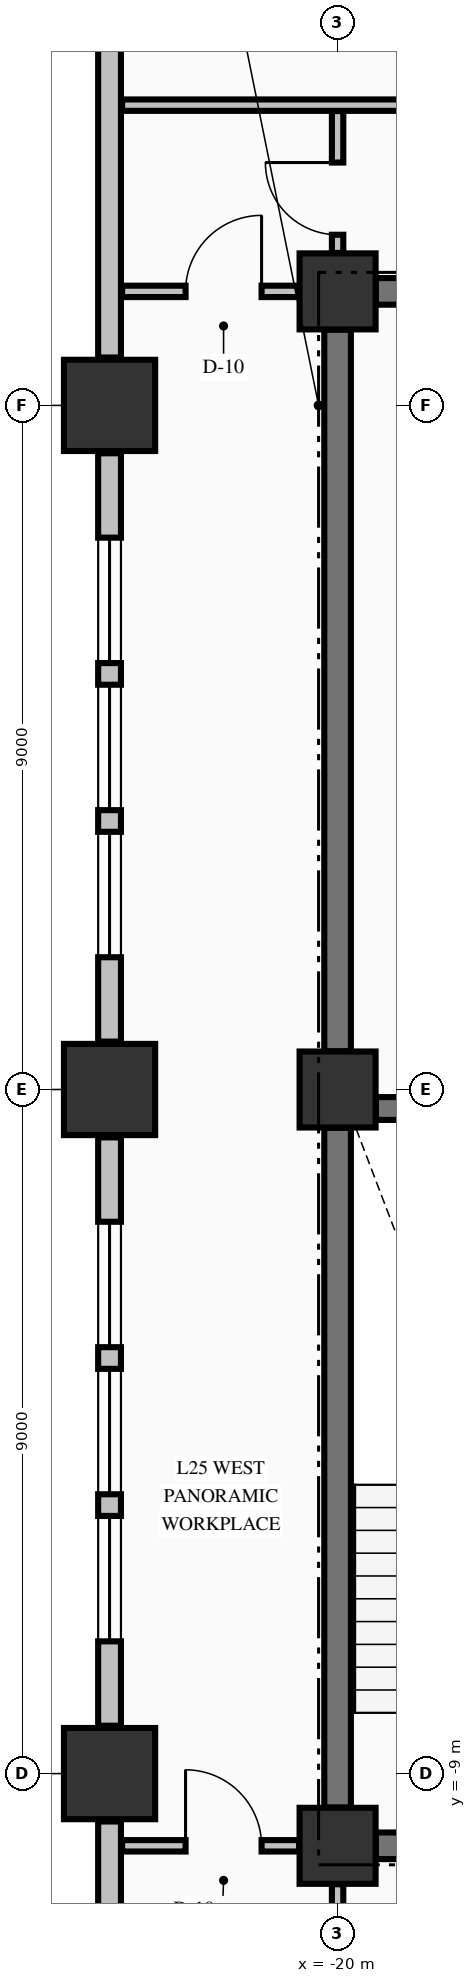
"""IFC4 building model, lengths in metres.
Left out: names, types, materials, properties, quantities, classifications, styles, units other than length and angle.
Written with IfcOpenShell. Run it as: python <this file> out.ifc"""

import sys

from ifc_helpers import new_model, si_unit, direction, frame, frame_2d, origin, origin_2d, place, context, subcontext, project, spatial, rectangle, extrude, element, fill, save


model = new_model("IFC4")
c1 = context("Model", 3, precision=1e-05, world=origin(), true_north=direction((0.0, 1.0)))
c2 = subcontext(c1, "Body", "Model", "MODEL_VIEW")
j1 = project(units=[si_unit("LENGTHUNIT", "METRE"), si_unit("PLANEANGLEUNIT", "RADIAN")], contexts=[c1])
p1 = place(None, origin())
s1 = spatial("IfcSite", under=j1, at=p1, CompositionType="ELEMENT")
p2 = place(p1, origin())
s2 = spatial("IfcBuilding", under=s1, at=p2, CompositionType="ELEMENT")
p3 = place(p2, frame((0.0, 0.0, 102.07)))
s3 = spatial("IfcBuildingStorey", under=s2, at=p3, CompositionType="ELEMENT", Elevation=102.07)
for number, where, z_axis, x_axis in (
    (1, (-23.0, -9.0, -0.25), (0.0, 0.0, 1.0), (1.0, 0.0, 0.0)),
    (2, (-23.0, 0.0, -0.25), (0.0, 0.0, 1.0), (1.0, 0.0, 0.0)),
    (3, (-23.0, 9.0, -0.25), (0.0, 0.0, 1.0), (1.0, 0.0, 0.0)),
):
    element("IfcColumn", number, at=place(p3, frame(where, z_axis=z_axis, x_axis=x_axis)), inside=s3, PredefinedType="COLUMN", context=c2, shape_type="SweptSolid", body=[
        extrude(rectangle(XDim=1.2, YDim=1.2, at=origin_2d()), origin(), (0.0, 0.0, 1.0), 3.57),
    ])
for number, where, z_axis, x_axis in (
    (4, (-20.0, -9.95, -0.25), (0.0, 0.0, 1.0), (1.0, 0.0, 0.0)),
    (5, (-20.0, 10.5, -0.25), (0.0, 0.0, 1.0), (1.0, 0.0, 0.0)),
    (6, (-20.0, 0.0, -0.25), (0.0, 0.0, 1.0), (1.0, 0.0, 0.0)),
):
    element("IfcColumn", number, at=place(p3, frame(where, z_axis=z_axis, x_axis=x_axis)), inside=s3, PredefinedType="COLUMN", context=c2, shape_type="SweptSolid", body=[
        extrude(rectangle(XDim=1.0, YDim=1.0, at=origin_2d()), origin(), (0.0, 0.0, 1.0), 3.57),
    ])
p4 = place(p3, frame((-23.0, -9.63, 0.0), z_axis=(0.0, 0.0, 1.0), x_axis=(0.0, -1.0, 0.0)))
e7 = element("IfcWall", 7, at=p4, inside=s3, PredefinedType="STANDARD", context=c2, shape_type="SweptSolid", body=[
    extrude(rectangle(XDim=10.74, YDim=0.3, at=frame_2d((5.37, 0.0))), origin(), (0.0, 0.0, 1.0), 2.712),
])
p5 = place(p3, frame((-23.0, -0.63, 0.0), z_axis=(0.0, 0.0, 1.0), x_axis=(0.0, -1.0, 0.0)))
e8 = element("IfcWall", 8, at=p5, inside=s3, PredefinedType="STANDARD", context=c2, shape_type="SweptSolid", body=[
    extrude(rectangle(XDim=7.74, YDim=0.3, at=frame_2d((3.87, 0.0))), origin(), (0.0, 0.0, 1.0), 2.712),
])
p6 = place(p5, frame((1.11, 0.0, 0.8)))
e9 = element("IfcOpeningElement", 9, at=p6, cuts=e8, PredefinedType="OPENING", context=c2, shape_type="SweptSolid", body=[
    extrude(rectangle(XDim=1.65, YDim=1.7, at=frame_2d((0.825, 0.85))), frame((0.0, 0.16, 0.0), z_axis=(0.0, -1.0, 0.0), x_axis=(1.0, 0.0, 0.0)), (0.0, 0.0, 1.0), 0.32),
])
p7 = place(p5, frame((3.045, 0.0, 0.8)))
e10 = element("IfcOpeningElement", 10, at=p7, cuts=e8, PredefinedType="OPENING", context=c2, shape_type="SweptSolid", body=[
    extrude(rectangle(XDim=1.65, YDim=1.7, at=frame_2d((0.825, 0.85))), frame((0.0, 0.16, 0.0), z_axis=(0.0, -1.0, 0.0), x_axis=(1.0, 0.0, 0.0)), (0.0, 0.0, 1.0), 0.32),
])
p8 = place(p5, frame((4.98, 0.0, 0.8)))
e11 = element("IfcOpeningElement", 11, at=p8, cuts=e8, PredefinedType="OPENING", context=c2, shape_type="SweptSolid", body=[
    extrude(rectangle(XDim=1.65, YDim=1.7, at=frame_2d((0.825, 0.85))), frame((0.0, 0.16, 0.0), z_axis=(0.0, -1.0, 0.0), x_axis=(1.0, 0.0, 0.0)), (0.0, 0.0, 1.0), 0.32),
])
p9 = place(p3, frame((-23.0, 8.37, 0.0), z_axis=(0.0, 0.0, 1.0), x_axis=(0.0, -1.0, 0.0)))
e12 = element("IfcWall", 12, at=p9, inside=s3, PredefinedType="STANDARD", context=c2, shape_type="SweptSolid", body=[
    extrude(rectangle(XDim=7.74, YDim=0.3, at=frame_2d((3.87, 0.0))), origin(), (0.0, 0.0, 1.0), 2.712),
])
p10 = place(p9, frame((1.11, 0.0, 0.8)))
e13 = element("IfcOpeningElement", 13, at=p10, cuts=e12, PredefinedType="OPENING", context=c2, shape_type="SweptSolid", body=[
    extrude(rectangle(XDim=1.65, YDim=1.7, at=frame_2d((0.825, 0.85))), frame((0.0, 0.16, 0.0), z_axis=(0.0, -1.0, 0.0), x_axis=(1.0, 0.0, 0.0)), (0.0, 0.0, 1.0), 0.32),
])
p11 = place(p9, frame((3.045, 0.0, 0.8)))
e14 = element("IfcOpeningElement", 14, at=p11, cuts=e12, PredefinedType="OPENING", context=c2, shape_type="SweptSolid", body=[
    extrude(rectangle(XDim=1.65, YDim=1.7, at=frame_2d((0.825, 0.85))), frame((0.0, 0.16, 0.0), z_axis=(0.0, -1.0, 0.0), x_axis=(1.0, 0.0, 0.0)), (0.0, 0.0, 1.0), 0.32),
])
p12 = place(p9, frame((4.98, 0.0, 0.8)))
e15 = element("IfcOpeningElement", 15, at=p12, cuts=e12, PredefinedType="OPENING", context=c2, shape_type="SweptSolid", body=[
    extrude(rectangle(XDim=1.65, YDim=1.7, at=frame_2d((0.825, 0.85))), frame((0.0, 0.16, 0.0), z_axis=(0.0, -1.0, 0.0), x_axis=(1.0, 0.0, 0.0)), (0.0, 0.0, 1.0), 0.32),
])
p13 = place(p3, frame((-23.0, 20.37, 0.0), z_axis=(0.0, 0.0, 1.0), x_axis=(0.0, -1.0, 0.0)))
e16 = element("IfcWall", 16, at=p13, inside=s3, PredefinedType="STANDARD", context=c2, shape_type="SweptSolid", body=[
    extrude(rectangle(XDim=10.74, YDim=0.3, at=frame_2d((5.37, 0.0))), origin(), (0.0, 0.0, 1.0), 2.712),
])
p14 = place(p3, frame((-19.496, -9.95, 0.0), z_axis=(0.0, 0.0, 1.0), x_axis=(1.0, 0.0, 0.0)))
e17 = element("IfcWall", 17, at=p14, inside=s3, PredefinedType="SHEAR", context=c2, shape_type="SweptSolid", body=[
    extrude(rectangle(XDim=4.796, YDim=0.35, at=frame_2d((2.398, 0.0))), origin(), (0.0, 0.0, 1.0), 3.32),
])
p15 = place(p14, frame((0.671, 0.0, 0.0)))
e18 = element("IfcOpeningElement", 18, at=p15, cuts=e17, PredefinedType="OPENING", context=c2, shape_type="SweptSolid", body=[
    extrude(rectangle(XDim=1.05, YDim=2.15, at=frame_2d((0.525, 1.075))), frame((0.0, 0.185, 0.0), z_axis=(0.0, -1.0, 0.0), x_axis=(1.0, 0.0, 0.0)), (0.0, 0.0, 1.0), 0.37),
])
p16 = place(p3, frame((-19.496, -0.25, 0.0), z_axis=(0.0, 0.0, 1.0), x_axis=(1.0, 0.0, 0.0)))
e19 = element("IfcWall", 19, at=p16, inside=s3, PredefinedType="SHEAR", context=c2, shape_type="SweptSolid", body=[
    extrude(rectangle(XDim=7.992, YDim=0.3, at=frame_2d((3.996, 0.0))), origin(), (0.0, 0.0, 1.0), 3.32),
])
p17 = place(p16, frame((5.796, 0.0, 0.0)))
e20 = element("IfcOpeningElement", 20, at=p17, cuts=e19, PredefinedType="OPENING", context=c2, shape_type="SweptSolid", body=[
    extrude(rectangle(XDim=1.1, YDim=2.15, at=frame_2d((0.55, 1.075))), frame((0.0, 0.16, 0.0), z_axis=(0.0, -1.0, 0.0), x_axis=(1.0, 0.0, 0.0)), (0.0, 0.0, 1.0), 0.32),
])
p18 = place(p3, frame((-19.496, 10.5, 0.0), z_axis=(0.0, 0.0, 1.0), x_axis=(1.0, 0.0, 0.0)))
e21 = element("IfcWall", 21, at=p18, inside=s3, PredefinedType="SHEAR", context=c2, shape_type="SweptSolid", body=[
    extrude(rectangle(XDim=4.796, YDim=0.35, at=frame_2d((2.398, 0.0))), origin(), (0.0, 0.0, 1.0), 3.32),
])
p19 = place(p18, frame((0.646, 0.0, 0.0)))
e22 = element("IfcOpeningElement", 22, at=p19, cuts=e21, PredefinedType="OPENING", context=c2, shape_type="SweptSolid", body=[
    extrude(rectangle(XDim=0.9, YDim=2.15, at=frame_2d((0.45, 1.075))), frame((0.0, 0.185, 0.0), z_axis=(0.0, -1.0, 0.0), x_axis=(1.0, 0.0, 0.0)), (0.0, 0.0, 1.0), 0.37),
])
p20 = place(p18, frame((3.271, 0.0, 0.0)))
e23 = element("IfcOpeningElement", 23, at=p20, cuts=e21, PredefinedType="OPENING", context=c2, shape_type="SweptSolid", body=[
    extrude(rectangle(XDim=0.95, YDim=2.15, at=frame_2d((0.475, 1.075))), frame((0.0, 0.185, 0.0), z_axis=(0.0, -1.0, 0.0), x_axis=(1.0, 0.0, 0.0)), (0.0, 0.0, 1.0), 0.37),
])
p21 = place(p3, frame((-22.835, -9.95, 0.0), z_axis=(0.0, 0.0, 1.0), x_axis=(1.0, 0.0, 0.0)))
e24 = element("IfcWall", 24, at=p21, inside=s3, PredefinedType="PARTITIONING", context=c2, shape_type="SweptSolid", body=[
    extrude(rectangle(XDim=2.329, YDim=0.15, at=frame_2d((1.165, 0.0))), origin(), (0.0, 0.0, 1.0), 3.32),
])
p22 = place(p21, frame((0.835, 0.0, 0.0)))
e25 = element("IfcOpeningElement", 25, at=p22, cuts=e24, PredefinedType="OPENING", context=c2, shape_type="SweptSolid", body=[
    extrude(rectangle(XDim=1.0, YDim=2.15, at=frame_2d((0.5, 1.075))), frame((0.0, 0.085, 0.0), z_axis=(0.0, -1.0, 0.0), x_axis=(1.0, 0.0, 0.0)), (0.0, 0.0, 1.0), 0.17),
])
p23 = place(p3, frame((-22.835, 10.5, 0.0), z_axis=(0.0, 0.0, 1.0), x_axis=(1.0, 0.0, 0.0)))
e26 = element("IfcWall", 26, at=p23, inside=s3, PredefinedType="PARTITIONING", context=c2, shape_type="SweptSolid", body=[
    extrude(rectangle(XDim=2.329, YDim=0.15, at=frame_2d((1.165, 0.0))), origin(), (0.0, 0.0, 1.0), 3.32),
])
p24 = place(p23, frame((0.835, 0.0, 0.0)))
e27 = element("IfcOpeningElement", 27, at=p24, cuts=e26, PredefinedType="OPENING", context=c2, shape_type="SweptSolid", body=[
    extrude(rectangle(XDim=1.0, YDim=2.15, at=frame_2d((0.5, 1.075))), frame((0.0, 0.085, 0.0), z_axis=(0.0, -1.0, 0.0), x_axis=(1.0, 0.0, 0.0)), (0.0, 0.0, 1.0), 0.17),
])
p25 = place(p3, frame((-22.835, 12.95, 0.0), z_axis=(0.0, 0.0, 1.0), x_axis=(1.0, 0.0, 0.0)))
e28 = element("IfcWall", 28, at=p25, inside=s3, PredefinedType="PARTITIONING", context=c2, shape_type="SweptSolid", body=[
    extrude(rectangle(XDim=50.67, YDim=0.15, at=frame_2d((25.335, 0.0))), origin(), (0.0, 0.0, 1.0), 3.32),
])
p26 = place(p25, frame((8.13, 0.0, 0.0)))
e29 = element("IfcOpeningElement", 29, at=p26, cuts=e28, PredefinedType="OPENING", context=c2, shape_type="SweptSolid", body=[
    extrude(rectangle(XDim=1.05, YDim=2.15, at=frame_2d((0.525, 1.075))), frame((0.0, 0.085, 0.0), z_axis=(0.0, -1.0, 0.0), x_axis=(1.0, 0.0, 0.0)), (0.0, 0.0, 1.0), 0.17),
])
p27 = place(p25, frame((15.41, 0.0, 0.0)))
e30 = element("IfcOpeningElement", 30, at=p27, cuts=e28, PredefinedType="OPENING", context=c2, shape_type="SweptSolid", body=[
    extrude(rectangle(XDim=0.95, YDim=2.15, at=frame_2d((0.475, 1.075))), frame((0.0, 0.085, 0.0), z_axis=(0.0, -1.0, 0.0), x_axis=(1.0, 0.0, 0.0)), (0.0, 0.0, 1.0), 0.17),
])
p28 = place(p25, frame((22.66, 0.0, 0.0)))
e31 = element("IfcOpeningElement", 31, at=p28, cuts=e28, PredefinedType="OPENING", context=c2, shape_type="SweptSolid", body=[
    extrude(rectangle(XDim=0.95, YDim=2.15, at=frame_2d((0.475, 1.075))), frame((0.0, 0.085, 0.0), z_axis=(0.0, -1.0, 0.0), x_axis=(1.0, 0.0, 0.0)), (0.0, 0.0, 1.0), 0.17),
])
p29 = place(p25, frame((27.41, 0.0, 0.0)))
e32 = element("IfcOpeningElement", 32, at=p29, cuts=e28, PredefinedType="OPENING", context=c2, shape_type="SweptSolid", body=[
    extrude(rectangle(XDim=0.95, YDim=2.15, at=frame_2d((0.475, 1.075))), frame((0.0, 0.085, 0.0), z_axis=(0.0, -1.0, 0.0), x_axis=(1.0, 0.0, 0.0)), (0.0, 0.0, 1.0), 0.17),
])
p30 = place(p25, frame((32.16, 0.0, 0.0)))
e33 = element("IfcOpeningElement", 33, at=p30, cuts=e28, PredefinedType="OPENING", context=c2, shape_type="SweptSolid", body=[
    extrude(rectangle(XDim=0.95, YDim=2.15, at=frame_2d((0.475, 1.075))), frame((0.0, 0.085, 0.0), z_axis=(0.0, -1.0, 0.0), x_axis=(1.0, 0.0, 0.0)), (0.0, 0.0, 1.0), 0.17),
])
p31 = place(p25, frame((39.29, 0.0, 0.0)))
e34 = element("IfcOpeningElement", 34, at=p31, cuts=e28, PredefinedType="OPENING", context=c2, shape_type="SweptSolid", body=[
    extrude(rectangle(XDim=1.05, YDim=2.15, at=frame_2d((0.525, 1.075))), frame((0.0, 0.085, 0.0), z_axis=(0.0, -1.0, 0.0), x_axis=(1.0, 0.0, 0.0)), (0.0, 0.0, 1.0), 0.17),
])
p32 = place(p3, frame((-20.0, -9.446, 0.0), z_axis=(0.0, 0.0, 1.0), x_axis=(0.0, 1.0, 0.0)))
e35 = element("IfcWall", 35, at=p32, inside=s3, PredefinedType="SHEAR", context=c2, shape_type="SweptSolid", body=[
    extrude(rectangle(XDim=8.942, YDim=0.35, at=frame_2d((4.471, 0.0))), origin(), (0.0, 0.0, 1.0), 3.32),
])
p33 = place(p3, frame((-20.0, 0.504, 0.0), z_axis=(0.0, 0.0, 1.0), x_axis=(0.0, 1.0, 0.0)))
e36 = element("IfcWall", 36, at=p33, inside=s3, PredefinedType="SHEAR", context=c2, shape_type="SweptSolid", body=[
    extrude(rectangle(XDim=9.492, YDim=0.35, at=frame_2d((4.746, 0.0))), origin(), (0.0, 0.0, 1.0), 3.32),
])
p34 = place(p3, frame((-20.0, -13.022, 0.0), z_axis=(0.0, 0.0, 1.0), x_axis=(0.0, 1.0, 0.0)))
e37 = element("IfcWall", 37, at=p34, inside=s3, PredefinedType="PARTITIONING", context=c2, shape_type="SweptSolid", body=[
    extrude(rectangle(XDim=2.566, YDim=0.15, at=frame_2d((1.283, 0.0))), origin(), (0.0, 0.0, 1.0), 2.81),
])
p35 = place(p34, frame((1.027, 0.0, 0.0)))
e38 = element("IfcOpeningElement", 38, at=p35, cuts=e37, PredefinedType="OPENING", context=c2, shape_type="SweptSolid", body=[
    extrude(rectangle(XDim=0.95, YDim=2.15, at=frame_2d((0.475, 1.075))), frame((0.0, 0.085, 0.0), z_axis=(0.0, -1.0, 0.0), x_axis=(1.0, 0.0, 0.0)), (0.0, 0.0, 1.0), 0.17),
])
p36 = place(p3, frame((-20.0, 11.006, 0.0), z_axis=(0.0, 0.0, 1.0), x_axis=(0.0, 1.0, 0.0)))
e39 = element("IfcWall", 39, at=p36, inside=s3, PredefinedType="PARTITIONING", context=c2, shape_type="SweptSolid", body=[
    extrude(rectangle(XDim=1.866, YDim=0.15, at=frame_2d((0.933, 0.0))), origin(), (0.0, 0.0, 1.0), 2.81),
])
p37 = place(p36, frame((0.239, 0.0, 0.0)))
e40 = element("IfcOpeningElement", 40, at=p37, cuts=e39, PredefinedType="OPENING", context=c2, shape_type="SweptSolid", body=[
    extrude(rectangle(XDim=0.95, YDim=2.15, at=frame_2d((0.475, 1.075))), frame((0.0, 0.085, 0.0), z_axis=(0.0, -1.0, 0.0), x_axis=(1.0, 0.0, 0.0)), (0.0, 0.0, 1.0), 0.17),
])
p38 = place(p6, origin())
e41 = element("IfcWindow", 41, at=p38, inside=s3, PartitioningType="SINGLE_PANEL", PredefinedType="WINDOW", context=c2, shape_type="SweptSolid", body=[
    extrude(rectangle(XDim=1.65, YDim=1.7, at=frame_2d((0.825, 0.85))), frame((0.0, 0.03, 0.0), z_axis=(0.0, -1.0, 0.0), x_axis=(1.0, 0.0, 0.0)), (0.0, 0.0, 1.0), 0.06),
])
fill(e9, e41)
p39 = place(p7, origin())
e42 = element("IfcWindow", 42, at=p39, inside=s3, PartitioningType="SINGLE_PANEL", PredefinedType="WINDOW", context=c2, shape_type="SweptSolid", body=[
    extrude(rectangle(XDim=1.65, YDim=1.7, at=frame_2d((0.825, 0.85))), frame((0.0, 0.03, 0.0), z_axis=(0.0, -1.0, 0.0), x_axis=(1.0, 0.0, 0.0)), (0.0, 0.0, 1.0), 0.06),
])
fill(e10, e42)
p40 = place(p8, origin())
e43 = element("IfcWindow", 43, at=p40, inside=s3, PartitioningType="SINGLE_PANEL", PredefinedType="WINDOW", context=c2, shape_type="SweptSolid", body=[
    extrude(rectangle(XDim=1.65, YDim=1.7, at=frame_2d((0.825, 0.85))), frame((0.0, 0.03, 0.0), z_axis=(0.0, -1.0, 0.0), x_axis=(1.0, 0.0, 0.0)), (0.0, 0.0, 1.0), 0.06),
])
fill(e11, e43)
p41 = place(p10, origin())
e44 = element("IfcWindow", 44, at=p41, inside=s3, PartitioningType="SINGLE_PANEL", PredefinedType="WINDOW", context=c2, shape_type="SweptSolid", body=[
    extrude(rectangle(XDim=1.65, YDim=1.7, at=frame_2d((0.825, 0.85))), frame((0.0, 0.03, 0.0), z_axis=(0.0, -1.0, 0.0), x_axis=(1.0, 0.0, 0.0)), (0.0, 0.0, 1.0), 0.06),
])
fill(e13, e44)
p42 = place(p11, origin())
e45 = element("IfcWindow", 45, at=p42, inside=s3, PartitioningType="SINGLE_PANEL", PredefinedType="WINDOW", context=c2, shape_type="SweptSolid", body=[
    extrude(rectangle(XDim=1.65, YDim=1.7, at=frame_2d((0.825, 0.85))), frame((0.0, 0.03, 0.0), z_axis=(0.0, -1.0, 0.0), x_axis=(1.0, 0.0, 0.0)), (0.0, 0.0, 1.0), 0.06),
])
fill(e14, e45)
p43 = place(p12, origin())
e46 = element("IfcWindow", 46, at=p43, inside=s3, PartitioningType="SINGLE_PANEL", PredefinedType="WINDOW", context=c2, shape_type="SweptSolid", body=[
    extrude(rectangle(XDim=1.65, YDim=1.7, at=frame_2d((0.825, 0.85))), frame((0.0, 0.03, 0.0), z_axis=(0.0, -1.0, 0.0), x_axis=(1.0, 0.0, 0.0)), (0.0, 0.0, 1.0), 0.06),
])
fill(e15, e46)
p44 = place(p37, origin())
e47 = element("IfcDoor", 47, at=p44, inside=s3, OperationType="SINGLE_SWING_RIGHT", PredefinedType="DOOR", context=c2, shape_type="SweptSolid", body=[
    extrude(rectangle(XDim=0.95, YDim=2.15, at=frame_2d((0.475, 1.075))), frame((0.0, 0.025, 0.0), z_axis=(0.0, -1.0, 0.0), x_axis=(1.0, 0.0, 0.0)), (0.0, 0.0, 1.0), 0.05),
])
fill(e40, e47)
p45 = place(p24, origin())
e48 = element("IfcDoor", 48, at=p45, inside=s3, OperationType="SINGLE_SWING_RIGHT", PredefinedType="DOOR", context=c2, shape_type="SweptSolid", body=[
    extrude(rectangle(XDim=1.0, YDim=2.15, at=frame_2d((0.5, 1.075))), frame((0.0, 0.025, 0.0), z_axis=(0.0, -1.0, 0.0), x_axis=(1.0, 0.0, 0.0)), (0.0, 0.0, 1.0), 0.05),
])
fill(e27, e48)
p46 = place(p22, origin())
e49 = element("IfcDoor", 49, at=p46, inside=s3, OperationType="SINGLE_SWING_LEFT", PredefinedType="DOOR", context=c2, shape_type="SweptSolid", body=[
    extrude(rectangle(XDim=1.0, YDim=2.15, at=frame_2d((0.5, 1.075))), frame((0.0, 0.025, 0.0), z_axis=(0.0, -1.0, 0.0), x_axis=(1.0, 0.0, 0.0)), (0.0, 0.0, 1.0), 0.05),
])
fill(e25, e49)
save(model, sys.argv[1])
